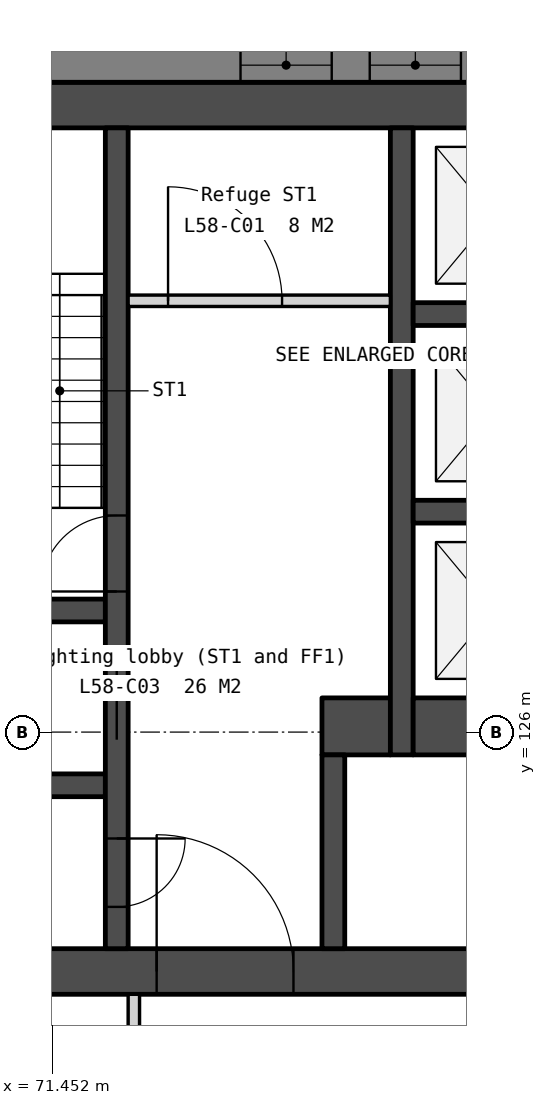
"""IFC4 building model, lengths in metres.
Left out: names, types, materials, properties, quantities, classifications, styles, units other than length and angle.
Written with IfcOpenShell. Run it as: python <this file> out.ifc"""

import sys

from ifc_helpers import new_model, si_unit, direction, frame, frame_2d, origin, place, context, subcontext, project, spatial, polyline, rectangle, outline, extrude, element, fill, save


model = new_model("IFC4")
c1 = context("Model", 3, precision=1e-05, world=origin(), true_north=direction((0.0, 1.0)))
c2 = subcontext(c1, "Body", "Model", "MODEL_VIEW")
j1 = project(units=[si_unit("LENGTHUNIT", "METRE"), si_unit("PLANEANGLEUNIT", "RADIAN")], contexts=[c1])
p1 = place(None, origin())
s1 = spatial("IfcSite", under=j1, at=p1, CompositionType="ELEMENT")
p2 = place(p1, origin())
s2 = spatial("IfcBuilding", under=s1, at=p2, CompositionType="ELEMENT")
p3 = place(p2, frame((0.0, 0.0, 238.7)))
s3 = spatial("IfcBuildingStorey", under=s2, at=p3, CompositionType="ELEMENT", Elevation=238.7)
p4 = place(p3, frame((69.0, 134.25, 0.0), z_axis=(0.0, 0.0, 1.0), x_axis=(1.0, 0.0, 0.0)))
e1 = element("IfcWall", 1, at=p4, inside=s3, PredefinedType="SOLIDWALL", context=c2, shape_type="SweptSolid", body=[
    extrude(rectangle(XDim=22.0, YDim=0.6, at=frame_2d((11.0, 0.0))), origin(), (0.0, 0.0, 1.0), 3.75),
])
p5 = place(p3, frame((69.0, 122.85, 0.0), z_axis=(0.0, 0.0, 1.0), x_axis=(1.0, 0.0, 0.0)))
e2 = element("IfcWall", 2, at=p5, inside=s3, PredefinedType="SOLIDWALL", context=c2, shape_type="SweptSolid", body=[
    extrude(rectangle(XDim=22.0, YDim=0.6, at=frame_2d((11.0, 0.0))), origin(), (0.0, 0.0, 1.0), 3.75),
])
p6 = place(p5, frame((16.375, 0.0, 0.0)))
e3 = element("IfcOpeningElement", 3, at=p6, cuts=e2, PredefinedType="OPENING", context=c2, shape_type="SweptSolid", body=[
    extrude(rectangle(XDim=1.8, YDim=2.1, at=frame_2d((0.9, 1.05))), frame((0.0, 0.31, 0.0), z_axis=(0.0, -1.0, 0.0), x_axis=(1.0, 0.0, 0.0)), (0.0, 0.0, 1.0), 0.62),
])
p7 = place(p5, frame((3.825, 0.0, 0.0)))
e4 = element("IfcOpeningElement", 4, at=p7, cuts=e2, PredefinedType="OPENING", context=c2, shape_type="SweptSolid", body=[
    extrude(rectangle(XDim=1.8, YDim=2.1, at=frame_2d((0.9, 1.05))), frame((0.0, 0.31, 0.0), z_axis=(0.0, -1.0, 0.0), x_axis=(1.0, 0.0, 0.0)), (0.0, 0.0, 1.0), 0.62),
])
p8 = place(p5, frame((12.85, 0.0, 0.0)))
e5 = element("IfcOpeningElement", 5, at=p8, cuts=e2, PredefinedType="OPENING", context=c2, shape_type="SweptSolid", body=[
    extrude(rectangle(XDim=1.5, YDim=2.1, at=frame_2d((0.75, 1.05))), frame((0.0, 0.31, 0.0), z_axis=(0.0, -1.0, 0.0), x_axis=(1.0, 0.0, 0.0)), (0.0, 0.0, 1.0), 0.62),
])
for number, where, z_axis, x_axis in (
    (6, (69.6, 127.6, 0.0), (0.0, 0.0, 1.0), (1.0, 0.0, 0.0)),
    (7, (69.6, 125.3, 0.0), (0.0, 0.0, 1.0), (1.0, 0.0, 0.0)),
):
    element("IfcWall", number, at=place(p3, frame(where, z_axis=z_axis, x_axis=x_axis)), inside=s3, PredefinedType="SOLIDWALL", context=c2, shape_type="SweptSolid", body=[
        extrude(rectangle(XDim=2.55, YDim=0.3, at=frame_2d((1.275, 0.0))), origin(), (0.0, 0.0, 1.0), 3.75),
    ])
p9 = place(p3, frame((72.3, 133.95, 0.0), z_axis=(0.0, 0.0, 1.0), x_axis=(0.0, -1.0, 0.0)))
e8 = element("IfcWall", 8, at=p9, inside=s3, PredefinedType="SOLIDWALL", context=c2, shape_type="SweptSolid", body=[
    extrude(rectangle(XDim=10.8, YDim=0.3, at=frame_2d((5.4, 0.0))), origin(), (0.0, 0.0, 1.0), 3.75),
])
p10 = place(p9, frame((6.95, 0.0, 0.0)))
e9 = element("IfcOpeningElement", 9, at=p10, cuts=e8, PredefinedType="OPENING", context=c2, shape_type="SweptSolid", body=[
    extrude(rectangle(XDim=1.1, YDim=2.1, at=frame_2d((0.55, 1.05))), frame((0.0, 0.16, 0.0), z_axis=(0.0, -1.0, 0.0), x_axis=(1.0, 0.0, 0.0)), (0.0, 0.0, 1.0), 0.32),
])
p11 = place(p9, frame((9.35, 0.0, 0.0)))
e10 = element("IfcOpeningElement", 10, at=p11, cuts=e8, PredefinedType="OPENING", context=c2, shape_type="SweptSolid", body=[
    extrude(rectangle(XDim=0.9, YDim=2.1, at=frame_2d((0.45, 1.05))), frame((0.0, 0.16, 0.0), z_axis=(0.0, -1.0, 0.0), x_axis=(1.0, 0.0, 0.0)), (0.0, 0.0, 1.0), 0.32),
])
p12 = place(p9, frame((5.1, 0.0, 0.0)))
e11 = element("IfcOpeningElement", 11, at=p12, cuts=e8, PredefinedType="OPENING", context=c2, shape_type="SweptSolid", body=[
    extrude(rectangle(XDim=1.0, YDim=2.1, at=frame_2d((0.5, 1.05))), frame((0.0, 0.16, 0.0), z_axis=(0.0, -1.0, 0.0), x_axis=(1.0, 0.0, 0.0)), (0.0, 0.0, 1.0), 0.32),
])
p13 = place(p3, frame((72.45, 131.675, 0.0), z_axis=(0.0, 0.0, 1.0), x_axis=(1.0, 0.0, 0.0)))
e12 = element("IfcWall", 12, at=p13, inside=s3, PredefinedType="PARTITIONING", context=c2, shape_type="SweptSolid", body=[
    extrude(rectangle(XDim=3.45, YDim=0.15, at=frame_2d((1.725, 0.0))), origin(), (0.0, 0.0, 1.0), 3.75),
])
p14 = place(p13, frame((0.525, 0.0, 0.0)))
e13 = element("IfcOpeningElement", 13, at=p14, cuts=e12, PredefinedType="OPENING", context=c2, shape_type="SweptSolid", body=[
    extrude(rectangle(XDim=1.5, YDim=2.1, at=frame_2d((0.75, 1.05))), frame((0.0, 0.085, 0.0), z_axis=(0.0, -1.0, 0.0), x_axis=(1.0, 0.0, 0.0)), (0.0, 0.0, 1.0), 0.17),
])
p15 = place(p3, frame((75.0, 126.075, 0.0), z_axis=(0.0, 0.0, 1.0), x_axis=(1.0, 0.0, 0.0)))
e14 = element("IfcWall", 14, at=p15, inside=s3, PredefinedType="SOLIDWALL", context=c2, shape_type="SweptSolid", body=[
    extrude(rectangle(XDim=0.9, YDim=0.75, at=frame_2d((0.45, 0.0))), origin(), (0.0, 0.0, 1.0), 3.75),
])
p16 = place(p3, frame((75.15, 125.7, 0.0), z_axis=(0.0, 0.0, 1.0), x_axis=(0.0, -1.0, 0.0)))
e15 = element("IfcWall", 15, at=p16, inside=s3, PredefinedType="SOLIDWALL", context=c2, shape_type="SweptSolid", body=[
    extrude(rectangle(XDim=2.55, YDim=0.3, at=frame_2d((1.275, 0.0))), origin(), (0.0, 0.0, 1.0), 3.75),
])
p17 = place(p3, frame((76.05, 133.95, 0.0), z_axis=(0.0, 0.0, 1.0), x_axis=(0.0, -1.0, 0.0)))
e16 = element("IfcWall", 16, at=p17, inside=s3, PredefinedType="SOLIDWALL", context=c2, shape_type="SweptSolid", body=[
    extrude(rectangle(XDim=8.25, YDim=0.3, at=frame_2d((4.125, 0.0))), origin(), (0.0, 0.0, 1.0), 3.75),
])
for number, where, z_axis, x_axis in (
    (17, (76.2, 131.5, 0.0), (0.0, 0.0, 1.0), (1.0, 0.0, 0.0)),
    (18, (76.2, 128.9, 0.0), (0.0, 0.0, 1.0), (1.0, 0.0, 0.0)),
):
    element("IfcWall", number, at=place(p3, frame(where, z_axis=z_axis, x_axis=x_axis)), inside=s3, PredefinedType="SOLIDWALL", context=c2, shape_type="SweptSolid", body=[
        extrude(rectangle(XDim=2.1, YDim=0.3, at=frame_2d((1.05, 0.0))), origin(), (0.0, 0.0, 1.0), 3.75),
    ])
p18 = place(p3, frame((76.2, 126.075, 0.0), z_axis=(0.0, 0.0, 1.0), x_axis=(1.0, 0.0, 0.0)))
e19 = element("IfcWall", 19, at=p18, inside=s3, PredefinedType="SOLIDWALL", context=c2, shape_type="SweptSolid", body=[
    extrude(rectangle(XDim=2.1, YDim=0.75, at=frame_2d((1.05, 0.0))), origin(), (0.0, 0.0, 1.0), 3.75),
])
p19 = place(p3, frame((98.486, 134.775, -0.45), z_axis=(0.0, 0.0, 1.0), x_axis=(-1.0, 0.0, 0.0)))
e20 = element("IfcWall", 20, at=p19, inside=s3, PredefinedType="SOLIDWALL", context=c2, shape_type="SweptSolid", body=[
    extrude(outline(polyline([(36.972, 0.0), (36.972, 4.2), (0.0, 4.2), (0.0, 0.0), (36.972, 0.0)])), frame((0.0, 0.225, 0.0), z_axis=(0.0, -1.0, 0.0), x_axis=(1.0, 0.0, 0.0)), (0.0, 0.0, 1.0), 0.45),
])
p20 = place(p19, frame((3.172, 0.0, 1.25)))
e21 = element("IfcOpeningElement", 21, at=p20, cuts=e20, PredefinedType="OPENING", context=c2, shape_type="SweptSolid", body=[
    extrude(rectangle(XDim=1.2, YDim=2.2, at=frame_2d((0.6, 1.1))), frame((0.0, 0.235, 0.0), z_axis=(0.0, -1.0, 0.0), x_axis=(1.0, 0.0, 0.0)), (0.0, 0.0, 1.0), 0.47),
])
p21 = place(p19, frame((4.872, 0.0, 1.25)))
e22 = element("IfcOpeningElement", 22, at=p21, cuts=e20, PredefinedType="OPENING", context=c2, shape_type="SweptSolid", body=[
    extrude(rectangle(XDim=1.2, YDim=2.2, at=frame_2d((0.6, 1.1))), frame((0.0, 0.235, 0.0), z_axis=(0.0, -1.0, 0.0), x_axis=(1.0, 0.0, 0.0)), (0.0, 0.0, 1.0), 0.47),
])
p22 = place(p19, frame((12.415, 0.0, 1.25)))
e23 = element("IfcOpeningElement", 23, at=p22, cuts=e20, PredefinedType="OPENING", context=c2, shape_type="SweptSolid", body=[
    extrude(rectangle(XDim=1.2, YDim=2.2, at=frame_2d((0.6, 1.1))), frame((0.0, 0.235, 0.0), z_axis=(0.0, -1.0, 0.0), x_axis=(1.0, 0.0, 0.0)), (0.0, 0.0, 1.0), 0.47),
])
p23 = place(p19, frame((14.115, 0.0, 1.25)))
e24 = element("IfcOpeningElement", 24, at=p23, cuts=e20, PredefinedType="OPENING", context=c2, shape_type="SweptSolid", body=[
    extrude(rectangle(XDim=1.2, YDim=2.2, at=frame_2d((0.6, 1.1))), frame((0.0, 0.235, 0.0), z_axis=(0.0, -1.0, 0.0), x_axis=(1.0, 0.0, 0.0)), (0.0, 0.0, 1.0), 0.47),
])
p24 = place(p19, frame((21.658, 0.0, 1.25)))
e25 = element("IfcOpeningElement", 25, at=p24, cuts=e20, PredefinedType="OPENING", context=c2, shape_type="SweptSolid", body=[
    extrude(rectangle(XDim=1.2, YDim=2.2, at=frame_2d((0.6, 1.1))), frame((0.0, 0.235, 0.0), z_axis=(0.0, -1.0, 0.0), x_axis=(1.0, 0.0, 0.0)), (0.0, 0.0, 1.0), 0.47),
])
p25 = place(p19, frame((23.358, 0.0, 1.25)))
e26 = element("IfcOpeningElement", 26, at=p25, cuts=e20, PredefinedType="OPENING", context=c2, shape_type="SweptSolid", body=[
    extrude(rectangle(XDim=1.2, YDim=2.2, at=frame_2d((0.6, 1.1))), frame((0.0, 0.235, 0.0), z_axis=(0.0, -1.0, 0.0), x_axis=(1.0, 0.0, 0.0)), (0.0, 0.0, 1.0), 0.47),
])
p26 = place(p19, frame((30.901, 0.0, 1.25)))
e27 = element("IfcOpeningElement", 27, at=p26, cuts=e20, PredefinedType="OPENING", context=c2, shape_type="SweptSolid", body=[
    extrude(rectangle(XDim=1.2, YDim=2.2, at=frame_2d((0.6, 1.1))), frame((0.0, 0.235, 0.0), z_axis=(0.0, -1.0, 0.0), x_axis=(1.0, 0.0, 0.0)), (0.0, 0.0, 1.0), 0.47),
])
p27 = place(p19, frame((32.601, 0.0, 1.25)))
e28 = element("IfcOpeningElement", 28, at=p27, cuts=e20, PredefinedType="OPENING", context=c2, shape_type="SweptSolid", body=[
    extrude(rectangle(XDim=1.2, YDim=2.2, at=frame_2d((0.6, 1.1))), frame((0.0, 0.235, 0.0), z_axis=(0.0, -1.0, 0.0), x_axis=(1.0, 0.0, 0.0)), (0.0, 0.0, 1.0), 0.47),
])
p28 = place(p3, frame((60.609, 133.207, -0.45), z_axis=(0.0, 0.0, 1.0), x_axis=(0.500002536638, -0.866023939251, 0.0)))
e29 = element("IfcWall", 29, at=p28, inside=s3, PredefinedType="SOLIDWALL", context=c2, shape_type="SweptSolid", body=[
    extrude(outline(polyline([(36.972, 0.0), (36.972, 4.2), (0.0, 4.2), (0.0, 0.0), (36.972, 0.0)])), frame((0.0, 0.225, 0.0), z_axis=(0.0, -1.0, 0.0), x_axis=(1.0, 0.0, 0.0)), (0.0, 0.0, 1.0), 0.45),
])
p29 = place(p28, frame((3.172, 0.0, 1.25)))
e30 = element("IfcOpeningElement", 30, at=p29, cuts=e29, PredefinedType="OPENING", context=c2, shape_type="SweptSolid", body=[
    extrude(rectangle(XDim=1.2, YDim=2.2, at=frame_2d((0.6, 1.1))), frame((0.0, 0.235, 0.0), z_axis=(0.0, -1.0, 0.0), x_axis=(1.0, 0.0, 0.0)), (0.0, 0.0, 1.0), 0.47),
])
p30 = place(p28, frame((4.872, 0.0, 1.25)))
e31 = element("IfcOpeningElement", 31, at=p30, cuts=e29, PredefinedType="OPENING", context=c2, shape_type="SweptSolid", body=[
    extrude(rectangle(XDim=1.2, YDim=2.2, at=frame_2d((0.6, 1.1))), frame((0.0, 0.235, 0.0), z_axis=(0.0, -1.0, 0.0), x_axis=(1.0, 0.0, 0.0)), (0.0, 0.0, 1.0), 0.47),
])
p31 = place(p28, frame((12.415, 0.0, 1.25)))
e32 = element("IfcOpeningElement", 32, at=p31, cuts=e29, PredefinedType="OPENING", context=c2, shape_type="SweptSolid", body=[
    extrude(rectangle(XDim=1.2, YDim=2.2, at=frame_2d((0.6, 1.1))), frame((0.0, 0.235, 0.0), z_axis=(0.0, -1.0, 0.0), x_axis=(1.0, 0.0, 0.0)), (0.0, 0.0, 1.0), 0.47),
])
p32 = place(p28, frame((14.115, 0.0, 1.25)))
e33 = element("IfcOpeningElement", 33, at=p32, cuts=e29, PredefinedType="OPENING", context=c2, shape_type="SweptSolid", body=[
    extrude(rectangle(XDim=1.2, YDim=2.2, at=frame_2d((0.6, 1.1))), frame((0.0, 0.235, 0.0), z_axis=(0.0, -1.0, 0.0), x_axis=(1.0, 0.0, 0.0)), (0.0, 0.0, 1.0), 0.47),
])
p33 = place(p28, frame((21.658, 0.0, 1.25)))
e34 = element("IfcOpeningElement", 34, at=p33, cuts=e29, PredefinedType="OPENING", context=c2, shape_type="SweptSolid", body=[
    extrude(rectangle(XDim=1.2, YDim=2.2, at=frame_2d((0.6, 1.1))), frame((0.0, 0.235, 0.0), z_axis=(0.0, -1.0, 0.0), x_axis=(1.0, 0.0, 0.0)), (0.0, 0.0, 1.0), 0.47),
])
p34 = place(p28, frame((23.358, 0.0, 1.25)))
e35 = element("IfcOpeningElement", 35, at=p34, cuts=e29, PredefinedType="OPENING", context=c2, shape_type="SweptSolid", body=[
    extrude(rectangle(XDim=1.2, YDim=2.2, at=frame_2d((0.6, 1.1))), frame((0.0, 0.235, 0.0), z_axis=(0.0, -1.0, 0.0), x_axis=(1.0, 0.0, 0.0)), (0.0, 0.0, 1.0), 0.47),
])
p35 = place(p28, frame((30.901, 0.0, 1.25)))
e36 = element("IfcOpeningElement", 36, at=p35, cuts=e29, PredefinedType="OPENING", context=c2, shape_type="SweptSolid", body=[
    extrude(rectangle(XDim=1.2, YDim=2.2, at=frame_2d((0.6, 1.1))), frame((0.0, 0.235, 0.0), z_axis=(0.0, -1.0, 0.0), x_axis=(1.0, 0.0, 0.0)), (0.0, 0.0, 1.0), 0.47),
])
p36 = place(p28, frame((32.601, 0.0, 1.25)))
e37 = element("IfcOpeningElement", 37, at=p36, cuts=e29, PredefinedType="OPENING", context=c2, shape_type="SweptSolid", body=[
    extrude(rectangle(XDim=1.2, YDim=2.2, at=frame_2d((0.6, 1.1))), frame((0.0, 0.235, 0.0), z_axis=(0.0, -1.0, 0.0), x_axis=(1.0, 0.0, 0.0)), (0.0, 0.0, 1.0), 0.47),
])
p37 = place(p3, frame((72.525, 119.875, 0.0), z_axis=(0.0, 0.0, 1.0), x_axis=(0.0, 1.0, 0.0)))
e38 = element("IfcWall", 38, at=p37, inside=s3, PredefinedType="PARTITIONING", context=c2, shape_type="SweptSolid", body=[
    extrude(rectangle(XDim=2.675, YDim=0.15, at=frame_2d((1.337, 0.0))), origin(), (0.0, 0.0, 1.0), 3.75),
])
p38 = place(p37, frame((0.837, 0.0, 0.0)))
e39 = element("IfcOpeningElement", 39, at=p38, cuts=e38, PredefinedType="OPENING", context=c2, shape_type="SweptSolid", body=[
    extrude(rectangle(XDim=1.0, YDim=2.1, at=frame_2d((0.5, 1.05))), frame((0.0, 0.085, 0.0), z_axis=(0.0, -1.0, 0.0), x_axis=(1.0, 0.0, 0.0)), (0.0, 0.0, 1.0), 0.17),
])
p39 = place(p10, origin())
e40 = element("IfcDoor", 40, at=p39, inside=s3, OperationType="SLIDING_TO_LEFT", PredefinedType="DOOR", context=c2, shape_type="SweptSolid", body=[
    extrude(rectangle(XDim=1.1, YDim=2.1, at=frame_2d((0.55, 1.05))), frame((0.0, 0.025, 0.0), z_axis=(0.0, -1.0, 0.0), x_axis=(1.0, 0.0, 0.0)), (0.0, 0.0, 1.0), 0.05),
])
fill(e9, e40)
p40 = place(p7, origin())
e41 = element("IfcDoor", 41, at=p40, inside=s3, OperationType="DOUBLE_DOOR_DOUBLE_SWING", PredefinedType="DOOR", context=c2, shape_type="SweptSolid", body=[
    extrude(rectangle(XDim=1.8, YDim=2.1, at=frame_2d((0.9, 1.05))), frame((0.0, 0.025, 0.0), z_axis=(0.0, -1.0, 0.0), x_axis=(1.0, 0.0, 0.0)), (0.0, 0.0, 1.0), 0.05),
])
fill(e4, e41)
p41 = place(p14, origin())
e42 = element("IfcDoor", 42, at=p41, inside=s3, OperationType="DOUBLE_DOOR_DOUBLE_SWING", PredefinedType="DOOR", context=c2, shape_type="SweptSolid", body=[
    extrude(rectangle(XDim=1.5, YDim=2.1, at=frame_2d((0.75, 1.05))), frame((0.0, 0.025, 0.0), z_axis=(0.0, -1.0, 0.0), x_axis=(1.0, 0.0, 0.0)), (0.0, 0.0, 1.0), 0.05),
])
fill(e13, e42)
p42 = place(p11, origin())
e43 = element("IfcDoor", 43, at=p42, inside=s3, OperationType="SINGLE_SWING_LEFT", PredefinedType="DOOR", context=c2, shape_type="SweptSolid", body=[
    extrude(rectangle(XDim=0.9, YDim=2.1, at=frame_2d((0.45, 1.05))), frame((0.0, 0.025, 0.0), z_axis=(0.0, -1.0, 0.0), x_axis=(1.0, 0.0, 0.0)), (0.0, 0.0, 1.0), 0.05),
])
fill(e10, e43)
p43 = place(p12, origin())
e44 = element("IfcDoor", 44, at=p43, inside=s3, OperationType="SINGLE_SWING_RIGHT", PredefinedType="DOOR", context=c2, shape_type="SweptSolid", body=[
    extrude(rectangle(XDim=1.0, YDim=2.1, at=frame_2d((0.5, 1.05))), frame((0.0, 0.025, 0.0), z_axis=(0.0, -1.0, 0.0), x_axis=(1.0, 0.0, 0.0)), (0.0, 0.0, 1.0), 0.05),
])
fill(e11, e44)
p44 = place(p24, origin())
e45 = element("IfcWindow", 45, at=p44, inside=s3, PartitioningType="SINGLE_PANEL", PredefinedType="WINDOW", context=c2, shape_type="SweptSolid", body=[
    extrude(rectangle(XDim=1.2, YDim=2.2, at=frame_2d((0.6, 1.1))), frame((0.0, 0.03, 0.0), z_axis=(0.0, -1.0, 0.0), x_axis=(1.0, 0.0, 0.0)), (0.0, 0.0, 1.0), 0.06),
])
fill(e25, e45)
p45 = place(p25, origin())
e46 = element("IfcWindow", 46, at=p45, inside=s3, PartitioningType="SINGLE_PANEL", PredefinedType="WINDOW", context=c2, shape_type="SweptSolid", body=[
    extrude(rectangle(XDim=1.2, YDim=2.2, at=frame_2d((0.6, 1.1))), frame((0.0, 0.03, 0.0), z_axis=(0.0, -1.0, 0.0), x_axis=(1.0, 0.0, 0.0)), (0.0, 0.0, 1.0), 0.06),
])
fill(e26, e46)
save(model, sys.argv[1])
